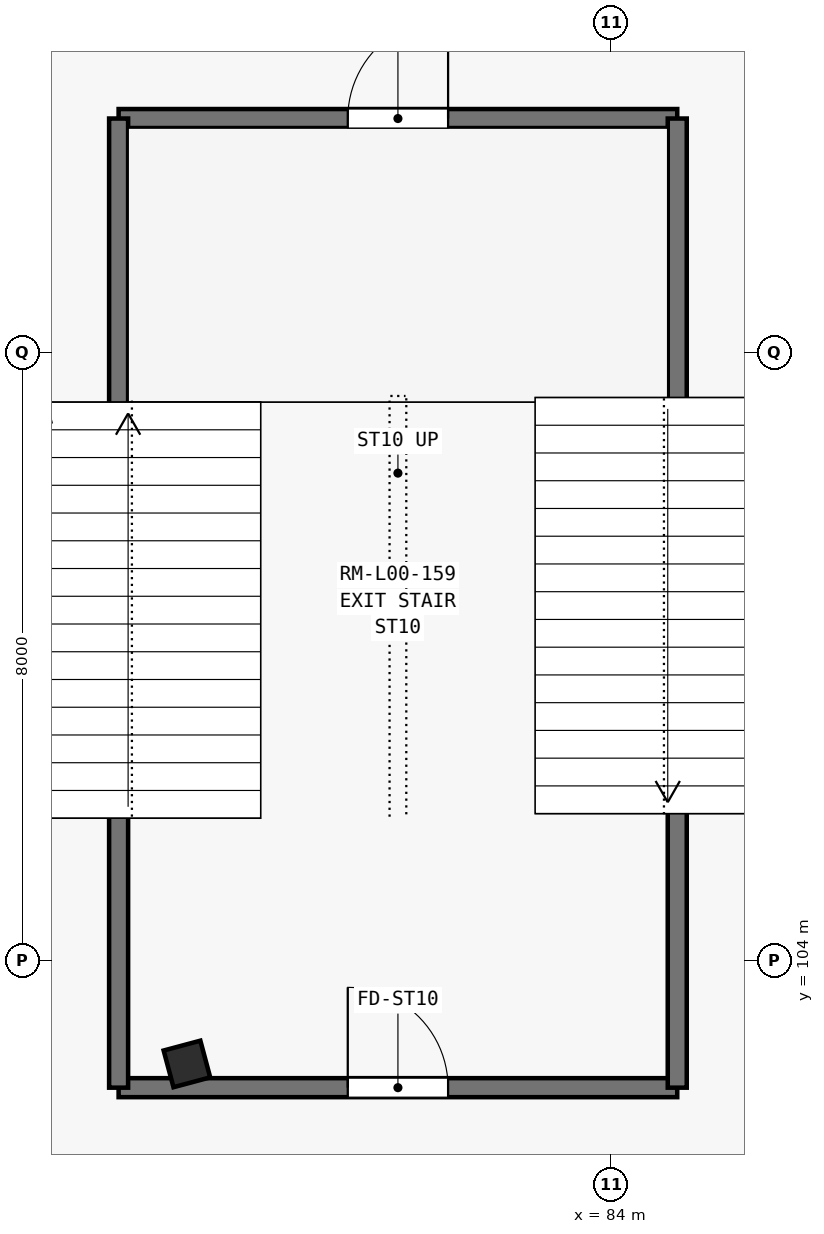
"""IFC4 building model, lengths in metres.
Left out: names, types, materials, properties, quantities, classifications, styles, units other than length and angle.
Written with IfcOpenShell. Run it as: python <this file> out.ifc"""

import sys

from ifc_helpers import new_model, si_unit, direction, frame, frame_2d, origin, origin_2d, place, context, subcontext, project, spatial, rectangle, i_section, extrude, element, fill, save


model = new_model("IFC4")
c1 = context("Model", 3, precision=1e-05, world=origin(), true_north=direction((0.0, 1.0)))
c2 = subcontext(c1, "Body", "Model", "MODEL_VIEW")
j1 = project(units=[si_unit("LENGTHUNIT", "METRE"), si_unit("PLANEANGLEUNIT", "RADIAN")], contexts=[c1])
p1 = place(None, origin())
s1 = spatial("IfcSite", under=j1, at=p1, CompositionType="ELEMENT")
p2 = place(p1, origin())
s2 = spatial("IfcBuilding", under=s1, at=p2, CompositionType="ELEMENT")
p3 = place(p2, origin())
s3 = spatial("IfcBuildingStorey", under=s2, at=p3, CompositionType="ELEMENT", Elevation=0.0)
p4 = place(p3, frame((78.424, 102.637, 0.0), z_axis=(0.0, 0.0, 1.0), x_axis=(-0.258819045103, 0.965925826289, 0.0)))
e1 = element("IfcColumn", 1, at=p4, inside=s3, PredefinedType="COLUMN", context=c2, shape_type="SweptSolid", body=[
    extrude(i_section(OverallWidth=0.5, OverallDepth=0.5, WebThickness=0.025, FlangeThickness=0.042, at=origin_2d()), origin(), (0.0, 0.0, 1.0), 5.4),
])
p5 = place(p3, frame((77.525, 102.325, 0.0), z_axis=(0.0, 0.0, 1.0), x_axis=(1.0, 0.0, 0.0)))
e2 = element("IfcWall", 2, at=p5, inside=s3, PredefinedType="SHEAR", context=c2, shape_type="SweptSolid", body=[
    extrude(rectangle(XDim=7.35, YDim=0.25, at=frame_2d((3.675, 0.0))), origin(), (0.0, 0.0, 1.0), 5.4),
])
p6 = place(p5, frame((3.015, 0.0, 0.0)))
e3 = element("IfcOpeningElement", 3, at=p6, cuts=e2, PredefinedType="OPENING", context=c2, shape_type="SweptSolid", body=[
    extrude(rectangle(XDim=1.32, YDim=2.2, at=frame_2d((0.66, 1.1))), frame((0.0, 0.135, 0.0), z_axis=(0.0, -1.0, 0.0), x_axis=(1.0, 0.0, 0.0)), (0.0, 0.0, 1.0), 0.27),
])
p7 = place(p3, frame((77.525, 115.075, 0.0), z_axis=(0.0, 0.0, 1.0), x_axis=(1.0, 0.0, 0.0)))
e4 = element("IfcWall", 4, at=p7, inside=s3, PredefinedType="SHEAR", context=c2, shape_type="SweptSolid", body=[
    extrude(rectangle(XDim=7.35, YDim=0.25, at=frame_2d((3.675, 0.0))), origin(), (0.0, 0.0, 1.0), 5.4),
])
p8 = place(p7, frame((3.015, 0.0, 0.0)))
e5 = element("IfcOpeningElement", 5, at=p8, cuts=e4, PredefinedType="OPENING", context=c2, shape_type="SweptSolid", body=[
    extrude(rectangle(XDim=1.32, YDim=2.2, at=frame_2d((0.66, 1.1))), frame((0.0, 0.135, 0.0), z_axis=(0.0, -1.0, 0.0), x_axis=(1.0, 0.0, 0.0)), (0.0, 0.0, 1.0), 0.27),
])
for number, where, z_axis, x_axis in (
    (6, (77.525, 102.325, 0.0), (0.0, 0.0, 1.0), (0.0, 1.0, 0.0)),
    (7, (84.875, 102.325, 0.0), (0.0, 0.0, 1.0), (0.0, 1.0, 0.0)),
):
    element("IfcWall", number, at=place(p3, frame(where, z_axis=z_axis, x_axis=x_axis)), inside=s3, PredefinedType="SHEAR", context=c2, shape_type="SweptSolid", body=[
        extrude(rectangle(XDim=12.75, YDim=0.25, at=frame_2d((6.375, 0.0))), origin(), (0.0, 0.0, 1.0), 5.4),
    ])
p9 = place(p3, frame((99.425, 109.2, 0.0), z_axis=(0.0, 0.0, 1.0), x_axis=(-1.0, 0.0, 0.0)))
e8 = element("IfcWall", 8, at=p9, inside=s3, PredefinedType="SOLIDWALL", context=c2, shape_type="SweptSolid", body=[
    extrude(rectangle(XDim=14.05, YDim=0.22, at=frame_2d((7.025, 0.0))), origin(), (0.0, 0.0, 1.0), 4.483),
])
p10 = place(p9, frame((6.365, 0.0, 0.0)))
e9 = element("IfcOpeningElement", 9, at=p10, cuts=e8, PredefinedType="OPENING", context=c2, shape_type="SweptSolid", body=[
    extrude(rectangle(XDim=1.32, YDim=2.2, at=frame_2d((0.66, 1.1))), frame((0.0, 0.12, 0.0), z_axis=(0.0, -1.0, 0.0), x_axis=(1.0, 0.0, 0.0)), (0.0, 0.0, 1.0), 0.24),
])
p11 = place(p3, frame((77.025, 109.2, 0.0), z_axis=(0.0, 0.0, 1.0), x_axis=(-1.0, 0.0, 0.0)))
e10 = element("IfcWall", 10, at=p11, inside=s3, PredefinedType="SOLIDWALL", context=c2, shape_type="SweptSolid", body=[
    extrude(rectangle(XDim=8.45, YDim=0.22, at=frame_2d((4.225, 0.0))), origin(), (0.0, 0.0, 1.0), 4.493),
])
p12 = place(p6, origin())
e11 = element("IfcDoor", 11, at=p12, inside=s3, OperationType="SINGLE_SWING_LEFT", PredefinedType="DOOR", context=c2, shape_type="SweptSolid", body=[
    extrude(rectangle(XDim=1.32, YDim=2.2, at=frame_2d((0.66, 1.1))), frame((0.0, 0.025, 0.0), z_axis=(0.0, -1.0, 0.0), x_axis=(1.0, 0.0, 0.0)), (0.0, 0.0, 1.0), 0.05),
])
fill(e3, e11)
p13 = place(p8, origin())
e12 = element("IfcDoor", 12, at=p13, inside=s3, OperationType="SINGLE_SWING_RIGHT", PredefinedType="DOOR", context=c2, shape_type="SweptSolid", body=[
    extrude(rectangle(XDim=1.32, YDim=2.2, at=frame_2d((0.66, 1.1))), frame((0.0, 0.025, 0.0), z_axis=(0.0, -1.0, 0.0), x_axis=(1.0, 0.0, 0.0)), (0.0, 0.0, 1.0), 0.05),
])
fill(e5, e12)
save(model, sys.argv[1])
